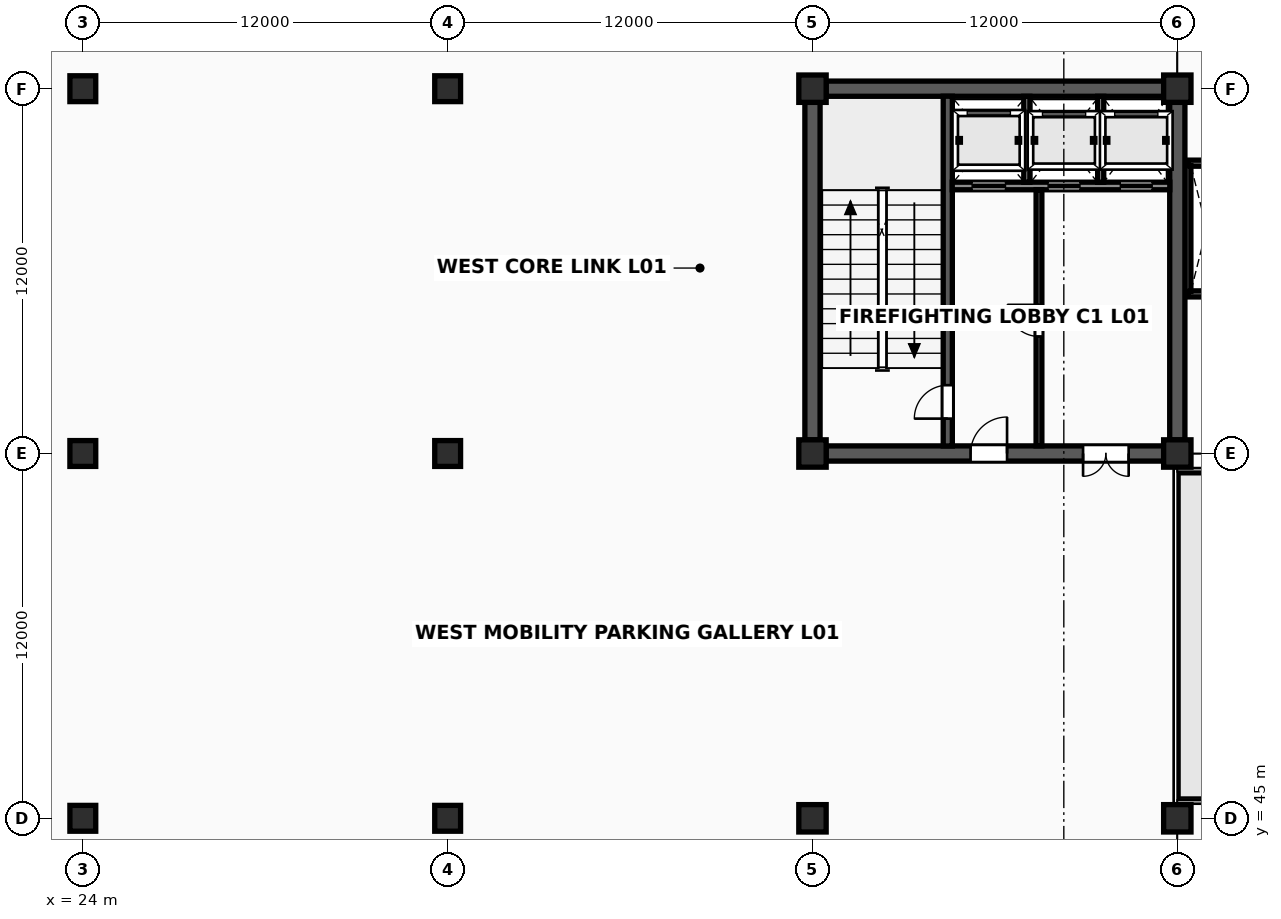
"""IFC4 building model, lengths in metres.
Left out: names, types, materials, properties, quantities, classifications, styles, units other than length and angle.
Written with IfcOpenShell. Run it as: python <this file> out.ifc"""

import sys

from ifc_helpers import new_model, si_unit, direction, frame, frame_2d, origin, origin_2d, place, context, subcontext, project, spatial, rectangle, extrude, element, fill, save


model = new_model("IFC4")
c1 = context("Model", 3, precision=1e-05, world=origin(), true_north=direction((0.0, 1.0)))
c2 = subcontext(c1, "Body", "Model", "MODEL_VIEW")
j1 = project(units=[si_unit("LENGTHUNIT", "METRE"), si_unit("PLANEANGLEUNIT", "RADIAN")], contexts=[c1])
p1 = place(None, origin())
s1 = spatial("IfcSite", under=j1, at=p1, CompositionType="ELEMENT")
p2 = place(p1, origin())
s2 = spatial("IfcBuilding", under=s1, at=p2, CompositionType="ELEMENT")
p3 = place(p2, frame((0.0, 0.0, 5.4)))
s3 = spatial("IfcBuildingStorey", under=s2, at=p3, CompositionType="ELEMENT", Elevation=5.4)
for number, where, z_axis, x_axis in (
    (1, (24.0, 45.0, 0.0), (0.0, 0.0, 1.0), (1.0, 0.0, 0.0)),
    (2, (24.0, 57.0, 0.0), (0.0, 0.0, 1.0), (1.0, 0.0, 0.0)),
    (3, (24.0, 69.0, 0.0), (0.0, 0.0, 1.0), (1.0, 0.0, 0.0)),
    (4, (36.0, 45.0, 0.0), (0.0, 0.0, 1.0), (1.0, 0.0, 0.0)),
    (5, (36.0, 57.0, 0.0), (0.0, 0.0, 1.0), (1.0, 0.0, 0.0)),
    (6, (36.0, 69.0, 0.0), (0.0, 0.0, 1.0), (1.0, 0.0, 0.0)),
):
    element("IfcColumn", number, at=place(p3, frame(where, z_axis=z_axis, x_axis=x_axis)), inside=s3, PredefinedType="COLUMN", context=c2, shape_type="SweptSolid", body=[
        extrude(rectangle(XDim=0.85, YDim=0.85, at=origin_2d()), origin(), (0.0, 0.0, 1.0), 4.2),
    ])
for number, where, z_axis, x_axis in (
    (7, (48.0, 45.0, 0.0), (0.0, 0.0, 1.0), (1.0, 0.0, 0.0)),
    (8, (48.0, 57.0, 0.0), (0.0, 0.0, 1.0), (1.0, 0.0, 0.0)),
    (9, (48.0, 69.0, 0.0), (0.0, 0.0, 1.0), (1.0, 0.0, 0.0)),
    (10, (60.0, 45.0, 0.0), (0.0, 0.0, 1.0), (1.0, 0.0, 0.0)),
    (11, (60.0, 57.0, 0.0), (0.0, 0.0, 1.0), (1.0, 0.0, 0.0)),
    (12, (60.0, 69.0, 0.0), (0.0, 0.0, 1.0), (1.0, 0.0, 0.0)),
):
    element("IfcColumn", number, at=place(p3, frame(where, z_axis=z_axis, x_axis=x_axis)), inside=s3, PredefinedType="COLUMN", context=c2, shape_type="SweptSolid", body=[
        extrude(rectangle(XDim=0.9, YDim=0.9, at=origin_2d()), origin(), (0.0, 0.0, 1.0), 4.2),
    ])
for number, where, z_axis, x_axis in (
    (13, (60.347, 62.25, 0.0), (0.0, 0.0, 1.0), (1.0, 0.0, 0.0)),
    (14, (60.347, 66.55, 0.0), (0.0, 0.0, 1.0), (1.0, 0.0, 0.0)),
):
    element("IfcWall", number, at=place(p3, frame(where, z_axis=z_axis, x_axis=x_axis)), inside=s3, PredefinedType="SOLIDWALL", context=c2, shape_type="SweptSolid", body=[
        extrude(rectangle(XDim=1.233, YDim=0.2, at=frame_2d((0.617, 0.0))), origin(), (0.0, 0.0, 1.0), 4.043),
    ])
p4 = place(p3, frame((60.347, 62.33, 0.0), z_axis=(0.0, 0.0, 1.0), x_axis=(0.0, 1.0, 0.0)))
e15 = element("IfcWall", 15, at=p4, inside=s3, PredefinedType="SOLIDWALL", context=c2, shape_type="SweptSolid", body=[
    extrude(rectangle(XDim=4.14, YDim=0.2, at=frame_2d((2.07, 0.0))), origin(), (0.0, 0.0, 1.0), 4.043),
])
p5 = place(p3, frame((48.447, 57.0, 0.0), z_axis=(0.0, 0.0, 1.0), x_axis=(1.0, 0.0, 0.0)))
e16 = element("IfcWall", 16, at=p5, inside=s3, PredefinedType="SHEAR", context=c2, shape_type="SweptSolid", body=[
    extrude(rectangle(XDim=11.106, YDim=0.5, at=frame_2d((5.553, 0.0))), origin(), (0.0, 0.0, 1.0), 4.043),
])
p6 = place(p5, frame((4.753, 0.0, 0.0)))
e17 = element("IfcOpeningElement", 17, at=p6, cuts=e16, PredefinedType="OPENING", context=c2, shape_type="SweptSolid", body=[
    extrude(rectangle(XDim=1.2, YDim=2.2, at=frame_2d((0.6, 1.1))), frame((0.0, 0.265, 0.0), z_axis=(0.0, -1.0, 0.0), x_axis=(1.0, 0.0, 0.0)), (0.0, 0.0, 1.0), 0.53),
])
p7 = place(p5, frame((8.453, 0.0, 0.0)))
e18 = element("IfcOpeningElement", 18, at=p7, cuts=e16, PredefinedType="OPENING", context=c2, shape_type="SweptSolid", body=[
    extrude(rectangle(XDim=1.5, YDim=2.25, at=frame_2d((0.75, 1.125))), frame((0.0, 0.265, 0.0), z_axis=(0.0, -1.0, 0.0), x_axis=(1.0, 0.0, 0.0)), (0.0, 0.0, 1.0), 0.53),
])
for number, where, z_axis, x_axis in (
    (19, (48.447, 69.0, 0.0), (0.0, 0.0, 1.0), (1.0, 0.0, 0.0)),
    (20, (48.0, 57.447, 0.0), (0.0, 0.0, 1.0), (0.0, 1.0, 0.0)),
    (21, (60.0, 57.447, 0.0), (0.0, 0.0, 1.0), (0.0, 1.0, 0.0)),
):
    element("IfcWall", number, at=place(p3, frame(where, z_axis=z_axis, x_axis=x_axis)), inside=s3, PredefinedType="SHEAR", context=c2, shape_type="SweptSolid", body=[
        extrude(rectangle(XDim=11.106, YDim=0.5, at=frame_2d((5.553, 0.0))), origin(), (0.0, 0.0, 1.0), 4.043),
    ])
p8 = place(p3, frame((52.45, 57.247, 0.0), z_axis=(0.0, 0.0, 1.0), x_axis=(0.0, 1.0, 0.0)))
e22 = element("IfcWall", 22, at=p8, inside=s3, PredefinedType="SHEAR", context=c2, shape_type="SweptSolid", body=[
    extrude(rectangle(XDim=11.506, YDim=0.3, at=frame_2d((5.753, 0.0))), origin(), (0.0, 0.0, 1.0), 4.043),
])
p9 = place(p8, frame((0.9, 0.0, 0.0)))
e23 = element("IfcOpeningElement", 23, at=p9, cuts=e22, PredefinedType="OPENING", context=c2, shape_type="SweptSolid", body=[
    extrude(rectangle(XDim=1.1, YDim=2.2, at=frame_2d((0.55, 1.1))), frame((0.0, 0.165, 0.0), z_axis=(0.0, -1.0, 0.0), x_axis=(1.0, 0.0, 0.0)), (0.0, 0.0, 1.0), 0.33),
])
p10 = place(p3, frame((52.597, 65.8, 0.0), z_axis=(0.0, 0.0, 1.0), x_axis=(1.0, 0.0, 0.0)))
e24 = element("IfcWall", 24, at=p10, inside=s3, PredefinedType="SOLIDWALL", context=c2, shape_type="SweptSolid", body=[
    extrude(rectangle(XDim=7.156, YDim=0.25, at=frame_2d((3.578, 0.0))), origin(), (0.0, 0.0, 1.0), 4.043),
])
p11 = place(p10, frame((0.653, 0.0, 0.0)))
e25 = element("IfcOpeningElement", 25, at=p11, cuts=e24, PredefinedType="OPENING", context=c2, shape_type="SweptSolid", body=[
    extrude(rectangle(XDim=1.1, YDim=2.24, at=frame_2d((0.55, 1.12))), frame((0.0, 0.14, 0.0), z_axis=(0.0, -1.0, 0.0), x_axis=(1.0, 0.0, 0.0)), (0.0, 0.0, 1.0), 0.28),
])
p12 = place(p10, frame((3.153, 0.0, 0.0)))
e26 = element("IfcOpeningElement", 26, at=p12, cuts=e24, PredefinedType="OPENING", context=c2, shape_type="SweptSolid", body=[
    extrude(rectangle(XDim=1.05, YDim=2.2, at=frame_2d((0.525, 1.1))), frame((0.0, 0.14, 0.0), z_axis=(0.0, -1.0, 0.0), x_axis=(1.0, 0.0, 0.0)), (0.0, 0.0, 1.0), 0.28),
])
p13 = place(p10, frame((5.528, 0.0, 0.0)))
e27 = element("IfcOpeningElement", 27, at=p13, cuts=e24, PredefinedType="OPENING", context=c2, shape_type="SweptSolid", body=[
    extrude(rectangle(XDim=1.05, YDim=2.2, at=frame_2d((0.525, 1.1))), frame((0.0, 0.14, 0.0), z_axis=(0.0, -1.0, 0.0), x_axis=(1.0, 0.0, 0.0)), (0.0, 0.0, 1.0), 0.28),
])
for number, where, z_axis, x_axis in (
    (28, (55.05, 65.92, 0.0), (0.0, 0.0, 1.0), (0.0, 1.0, 0.0)),
    (29, (57.48, 65.92, 0.0), (0.0, 0.0, 1.0), (0.0, 1.0, 0.0)),
):
    element("IfcWall", number, at=place(p3, frame(where, z_axis=z_axis, x_axis=x_axis)), inside=s3, PredefinedType="SOLIDWALL", context=c2, shape_type="SweptSolid", body=[
        extrude(rectangle(XDim=2.83, YDim=0.2, at=frame_2d((1.415, 0.0))), origin(), (0.0, 0.0, 1.0), 4.033),
    ])
p14 = place(p3, frame((55.45, 57.25, 0.0), z_axis=(0.0, 0.0, 1.0), x_axis=(0.0, 1.0, 0.0)))
e30 = element("IfcWall", 30, at=p14, inside=s3, PredefinedType="SOLIDWALL", context=c2, shape_type="SweptSolid", body=[
    extrude(rectangle(XDim=8.43, YDim=0.19, at=frame_2d((4.215, 0.0))), origin(), (0.0, 0.0, 1.0), 4.033),
])
p15 = place(p14, frame((3.6, 0.0, 0.0)))
e31 = element("IfcOpeningElement", 31, at=p15, cuts=e30, PredefinedType="OPENING", context=c2, shape_type="SweptSolid", body=[
    extrude(rectangle(XDim=1.04, YDim=2.18, at=frame_2d((0.52, 1.09))), frame((0.0, 0.11, 0.0), z_axis=(0.0, -1.0, 0.0), x_axis=(1.0, 0.0, 0.0)), (0.0, 0.0, 1.0), 0.22),
])
p16 = place(p9, origin())
e32 = element("IfcDoor", 32, at=p16, inside=s3, OperationType="SINGLE_SWING_LEFT", PredefinedType="DOOR", context=c2, shape_type="SweptSolid", body=[
    extrude(rectangle(XDim=1.1, YDim=2.2, at=frame_2d((0.55, 1.1))), frame((0.0, 0.025, 0.0), z_axis=(0.0, -1.0, 0.0), x_axis=(1.0, 0.0, 0.0)), (0.0, 0.0, 1.0), 0.05),
])
fill(e23, e32)
p17 = place(p15, origin())
e33 = element("IfcDoor", 33, at=p17, inside=s3, OperationType="SINGLE_SWING_RIGHT", PredefinedType="DOOR", context=c2, shape_type="SweptSolid", body=[
    extrude(rectangle(XDim=1.04, YDim=2.18, at=frame_2d((0.52, 1.09))), frame((0.0, 0.025, 0.0), z_axis=(0.0, -1.0, 0.0), x_axis=(1.0, 0.0, 0.0)), (0.0, 0.0, 1.0), 0.05),
])
fill(e31, e33)
p18 = place(p6, origin())
e34 = element("IfcDoor", 34, at=p18, inside=s3, OperationType="SINGLE_SWING_RIGHT", PredefinedType="DOOR", context=c2, shape_type="SweptSolid", body=[
    extrude(rectangle(XDim=1.2, YDim=2.2, at=frame_2d((0.6, 1.1))), frame((0.0, 0.025, 0.0), z_axis=(0.0, -1.0, 0.0), x_axis=(1.0, 0.0, 0.0)), (0.0, 0.0, 1.0), 0.05),
])
fill(e17, e34)
p19 = place(p7, origin())
e35 = element("IfcDoor", 35, at=p19, inside=s3, OperationType="DOUBLE_DOOR_SINGLE_SWING", PredefinedType="DOOR", context=c2, shape_type="SweptSolid", body=[
    extrude(rectangle(XDim=1.5, YDim=2.25, at=frame_2d((0.75, 1.125))), frame((0.0, 0.025, 0.0), z_axis=(0.0, -1.0, 0.0), x_axis=(1.0, 0.0, 0.0)), (0.0, 0.0, 1.0), 0.05),
])
fill(e18, e35)
p20 = place(p11, origin())
e36 = element("IfcDoor", 36, at=p20, inside=s3, OperationType="SLIDING_TO_LEFT", PredefinedType="USERDEFINED", context=c2, shape_type="SweptSolid", body=[
    extrude(rectangle(XDim=1.1, YDim=2.24, at=frame_2d((0.55, 1.12))), frame((0.0, 0.025, 0.0), z_axis=(0.0, -1.0, 0.0), x_axis=(1.0, 0.0, 0.0)), (0.0, 0.0, 1.0), 0.05),
])
fill(e25, e36)
p21 = place(p12, origin())
e37 = element("IfcDoor", 37, at=p21, inside=s3, OperationType="SLIDING_TO_LEFT", PredefinedType="USERDEFINED", context=c2, shape_type="SweptSolid", body=[
    extrude(rectangle(XDim=1.05, YDim=2.2, at=frame_2d((0.525, 1.1))), frame((0.0, 0.025, 0.0), z_axis=(0.0, -1.0, 0.0), x_axis=(1.0, 0.0, 0.0)), (0.0, 0.0, 1.0), 0.05),
])
fill(e26, e37)
p22 = place(p13, origin())
e38 = element("IfcDoor", 38, at=p22, inside=s3, OperationType="SLIDING_TO_LEFT", PredefinedType="USERDEFINED", context=c2, shape_type="SweptSolid", body=[
    extrude(rectangle(XDim=1.05, YDim=2.2, at=frame_2d((0.525, 1.1))), frame((0.0, 0.025, 0.0), z_axis=(0.0, -1.0, 0.0), x_axis=(1.0, 0.0, 0.0)), (0.0, 0.0, 1.0), 0.05),
])
fill(e27, e38)
save(model, sys.argv[1])
